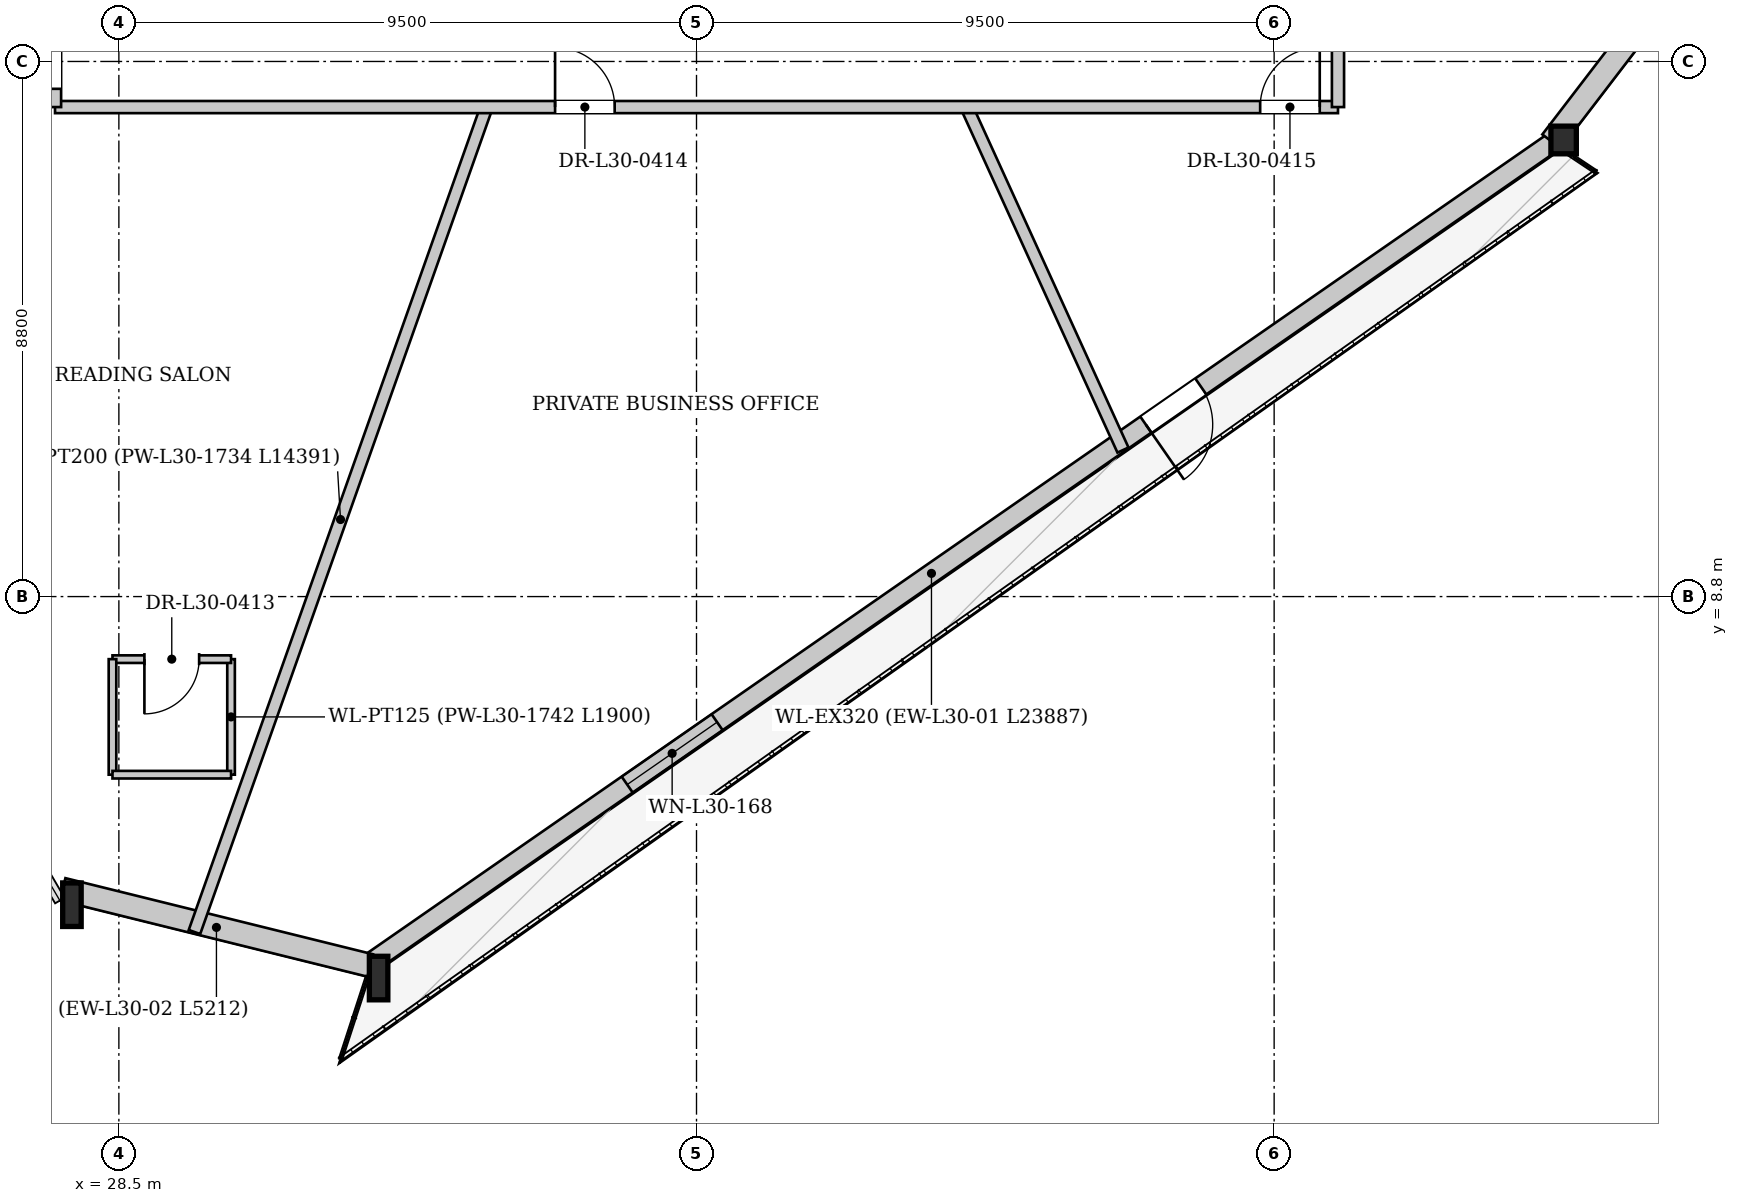
"""IFC4 building model, lengths in metres.
Left out: names, types, materials, properties, quantities, classifications, styles, units other than length and angle.
Written with IfcOpenShell. Run it as: python <this file> out.ifc"""

import sys

from ifc_helpers import new_model, si_unit, direction, frame, frame_2d, origin, origin_2d, place, context, subcontext, project, spatial, rectangle, i_section, extrude, source, transform, mapped, element, fill, save


model = new_model("IFC4")
c1 = context("Model", 3, precision=1e-05, world=origin(), true_north=direction((0.0, 1.0)))
c2 = subcontext(c1, "Body", "Model", "MODEL_VIEW")
j1 = project(units=[si_unit("LENGTHUNIT", "METRE"), si_unit("PLANEANGLEUNIT", "RADIAN")], contexts=[c1])
p1 = place(None, origin())
s1 = spatial("IfcSite", under=j1, at=p1, CompositionType="ELEMENT")
p2 = place(p1, origin())
s2 = spatial("IfcBuilding", under=s1, at=p2, CompositionType="ELEMENT")
p3 = place(p2, frame((0.0, 0.0, 116.35)))
s3 = spatial("IfcBuildingStorey", under=s2, at=p3, CompositionType="ELEMENT", Elevation=116.35)
m1 = source(origin(), c2, "Body", "SweptSolid", [
    extrude(i_section(OverallWidth=0.304, OverallDepth=0.716, WebThickness=0.021, FlangeThickness=0.04, at=origin_2d()), origin(), (0.0, 0.0, 1.0), 3.411),
])
p4 = place(p3, frame((27.53, 3.801, 0.0), z_axis=(0.116382892028, -0.039867940258, 0.992403934788), x_axis=(0.324071441703, 0.946032610787, 0.0)))
e1 = element("IfcColumn", 1, at=p4, inside=s3, PredefinedType="COLUMN", context=c2, shape_type="MappedRepresentation", body=[
    mapped(m1, transform((0.0, 0.0, 0.0), x_axis=(1.0, 0.0, 0.0), y_axis=(0.0, 1.0, 0.0), z_axis=(0.0, 0.0, 1.0), scale=1.0)),
])
m2 = source(origin(), c2, "Body", "SweptSolid", [
    extrude(i_section(OverallWidth=0.304, OverallDepth=0.716, WebThickness=0.021, FlangeThickness=0.04, at=origin_2d()), origin(), (0.0, 0.0, 1.0), 3.405),
])
p5 = place(p3, frame((32.588, 2.549, 0.0), z_axis=(0.107549004209, -0.013264377186, 0.994111295576), x_axis=(0.122405882176, 0.99248012575, 0.0)))
e2 = element("IfcColumn", 2, at=p5, inside=s3, PredefinedType="COLUMN", context=c2, shape_type="MappedRepresentation", body=[
    mapped(m2, transform((0.0, 0.0, 0.0), x_axis=(1.0, 0.0, 0.0), y_axis=(0.0, 1.0, 0.0), z_axis=(0.0, 0.0, 1.0), scale=1.0)),
])
m3 = source(origin(), c2, "Body", "SweptSolid", [
    extrude(i_section(OverallWidth=0.418, OverallDepth=0.455, WebThickness=0.038, FlangeThickness=0.059, at=origin_2d()), origin(), (0.0, 0.0, 1.0), 3.398),
])
p6 = place(p3, frame((52.212, 16.169, 0.0), z_axis=(0.02845253768, 0.08233991965, 0.996198068022), x_axis=(-0.945162434362, 0.326600631769, 0.0)))
e3 = element("IfcColumn", 3, at=p6, inside=s3, PredefinedType="COLUMN", context=c2, shape_type="MappedRepresentation", body=[
    mapped(m3, transform((0.0, 0.0, 0.0), x_axis=(1.0, 0.0, 0.0), y_axis=(0.0, 1.0, 0.0), z_axis=(0.0, 0.0, 1.0), scale=1.0)),
])
p7 = place(p3, frame((52.121, 16.301, 0.0), z_axis=(0.0, 0.0, 1.0), x_axis=(-0.821520503946, -0.570178973303, 0.0)))
e4 = element("IfcWall", 4, at=p7, inside=s3, PredefinedType="SOLIDWALL", context=c2, shape_type="SweptSolid", body=[
    extrude(rectangle(XDim=23.887, YDim=0.32, at=frame_2d((11.944, 0.0))), origin(), (0.0, 0.0, 1.0), 2.692),
])
p8 = place(p7, frame((7.094, 0.0, 0.0)))
e5 = element("IfcOpeningElement", 5, at=p8, cuts=e4, PredefinedType="OPENING", context=c2, shape_type="SweptSolid", body=[
    extrude(rectangle(XDim=1.1, YDim=2.3, at=frame_2d((0.55, 1.15))), frame((0.0, 0.17, 0.0), z_axis=(0.0, -1.0, 0.0), x_axis=(1.0, 0.0, 0.0)), (0.0, 0.0, 1.0), 0.34),
])
p9 = place(p7, frame((16.777, 0.0, 0.372)))
e6 = element("IfcOpeningElement", 6, at=p9, cuts=e4, PredefinedType="OPENING", context=c2, shape_type="SweptSolid", body=[
    extrude(rectangle(XDim=1.8, YDim=2.2, at=frame_2d((0.9, 1.1))), frame((0.0, 0.17, 0.0), z_axis=(0.0, -1.0, 0.0), x_axis=(1.0, 0.0, 0.0)), (0.0, 0.0, 1.0), 0.34),
])
p10 = place(p3, frame((32.634, 2.733, 0.0), z_axis=(0.0, 0.0, 1.0), x_axis=(-0.970715706746, 0.240231173408, 0.0)))
e7 = element("IfcWall", 7, at=p10, inside=s3, PredefinedType="SOLIDWALL", context=c2, shape_type="SweptSolid", body=[
    extrude(rectangle(XDim=5.211, YDim=0.38, at=frame_2d((2.606, 0.0))), origin(), (0.0, 0.0, 1.0), 2.692),
])
p11 = place(p3, frame((66.591, 35.245, 0.0), z_axis=(0.0, 0.0, 1.0), x_axis=(-0.608252150968, -0.7937438635, 0.0)))
e8 = element("IfcWall", 8, at=p11, inside=s3, PredefinedType="SOLIDWALL", context=c2, shape_type="SweptSolid", body=[
    extrude(rectangle(XDim=23.887, YDim=0.38, at=frame_2d((11.944, 0.0))), origin(), (0.0, 0.0, 1.0), 2.692),
])
p12 = place(p11, frame((6.088, 0.0, 0.65)))
e9 = element("IfcOpeningElement", 9, at=p12, cuts=e8, PredefinedType="OPENING", context=c2, shape_type="SweptSolid", body=[
    extrude(rectangle(XDim=1.2, YDim=1.5, at=frame_2d((0.6, 0.75))), frame((0.0, 0.2, 0.0), z_axis=(0.0, -1.0, 0.0), x_axis=(1.0, 0.0, 0.0)), (0.0, 0.0, 1.0), 0.4),
])
p13 = place(p11, frame((16.599, 0.0, 0.65)))
e10 = element("IfcOpeningElement", 10, at=p13, cuts=e8, PredefinedType="OPENING", context=c2, shape_type="SweptSolid", body=[
    extrude(rectangle(XDim=1.2, YDim=1.5, at=frame_2d((0.6, 0.75))), frame((0.0, 0.2, 0.0), z_axis=(0.0, -1.0, 0.0), x_axis=(1.0, 0.0, 0.0)), (0.0, 0.0, 1.0), 0.4),
])
p14 = place(p3, frame((34.547, 16.85, 0.0), z_axis=(0.0, 0.0, 1.0), x_axis=(-0.333802235789, -0.942643128327, 0.0)))
e11 = element("IfcWall", 11, at=p14, inside=s3, PredefinedType="PARTITIONING", context=c2, shape_type="SweptSolid", body=[
    extrude(rectangle(XDim=14.392, YDim=0.2, at=frame_2d((7.196, 0.0))), origin(), (0.0, 0.0, 1.0), 3.3),
])
p15 = place(p3, frame((42.443, 16.85, 0.0), z_axis=(0.0, 0.0, 1.0), x_axis=(0.41469000073, -0.909962748301, 0.0)))
e12 = element("IfcWall", 12, at=p15, inside=s3, PredefinedType="PARTITIONING", context=c2, shape_type="SweptSolid", body=[
    extrude(rectangle(XDim=6.199, YDim=0.2, at=frame_2d((3.099, 0.0))), origin(), (0.0, 0.0, 1.0), 3.3),
])
p16 = place(p3, frame((27.45, 19.349, 0.0), z_axis=(0.0, 0.0, 1.0), x_axis=(-0.824117180706, -0.566419343301, 0.0)))
e13 = element("IfcWall", 13, at=p16, inside=s3, PredefinedType="PARTITIONING", context=c2, shape_type="SweptSolid", body=[
    extrude(rectangle(XDim=7.761, YDim=0.2, at=frame_2d((3.88, 0.0))), origin(), (0.0, 0.0, 1.0), 3.3),
])
p17 = place(p3, frame((30.345, 5.871, 0.0), z_axis=(0.0, 0.0, 1.0), x_axis=(0.0, 1.0, 0.0)))
e14 = element("IfcWall", 14, at=p17, inside=s3, PredefinedType="PARTITIONING", context=c2, shape_type="SweptSolid", body=[
    extrude(rectangle(XDim=1.9, YDim=0.125, at=frame_2d((0.95, 0.0))), origin(), (0.0, 0.0, 1.0), 3.3),
])
p18 = place(p3, frame((30.345, 7.771, 0.0), z_axis=(0.0, 0.0, 1.0), x_axis=(-1.0, 0.0, 0.0)))
e15 = element("IfcWall", 15, at=p18, inside=s3, PredefinedType="PARTITIONING", context=c2, shape_type="SweptSolid", body=[
    extrude(rectangle(XDim=1.95, YDim=0.125, at=frame_2d((0.975, 0.0))), origin(), (0.0, 0.0, 1.0), 3.3),
])
p19 = place(p18, frame((0.525, 0.0, 0.0)))
e16 = element("IfcOpeningElement", 16, at=p19, cuts=e15, PredefinedType="OPENING", context=c2, shape_type="SweptSolid", body=[
    extrude(rectangle(XDim=0.9, YDim=2.1, at=frame_2d((0.45, 1.05))), frame((0.0, 0.073, 0.0), z_axis=(0.0, -1.0, 0.0), x_axis=(1.0, 0.0, 0.0)), (0.0, 0.0, 1.0), 0.145),
])
p20 = place(p3, frame((28.395, 7.771, 0.0), z_axis=(0.0, 0.0, 1.0), x_axis=(0.0, -1.0, 0.0)))
e17 = element("IfcWall", 17, at=p20, inside=s3, PredefinedType="PARTITIONING", context=c2, shape_type="SweptSolid", body=[
    extrude(rectangle(XDim=1.9, YDim=0.125, at=frame_2d((0.95, 0.0))), origin(), (0.0, 0.0, 1.0), 3.3),
])
p21 = place(p3, frame((28.395, 5.871, 0.0), z_axis=(0.0, 0.0, 1.0), x_axis=(1.0, 0.0, 0.0)))
e18 = element("IfcWall", 18, at=p21, inside=s3, PredefinedType="PARTITIONING", context=c2, shape_type="SweptSolid", body=[
    extrude(rectangle(XDim=1.95, YDim=0.125, at=frame_2d((0.975, 0.0))), origin(), (0.0, 0.0, 1.0), 3.3),
])
p22 = place(p3, frame((27.45, 16.85, 0.0), z_axis=(0.0, 0.0, 1.0), x_axis=(1.0, 0.0, 0.0)))
e19 = element("IfcWall", 19, at=p22, inside=s3, PredefinedType="PARTITIONING", context=c2, shape_type="SweptSolid", body=[
    extrude(rectangle(XDim=21.1, YDim=0.2, at=frame_2d((10.55, 0.0))), origin(), (0.0, 0.0, 1.0), 3.045),
])
p23 = place(p22, frame((8.224, 0.0, 0.0)))
e20 = element("IfcOpeningElement", 20, at=p23, cuts=e19, PredefinedType="OPENING", context=c2, shape_type="SweptSolid", body=[
    extrude(rectangle(XDim=0.98, YDim=2.15, at=frame_2d((0.49, 1.075))), frame((0.0, 0.11, 0.0), z_axis=(0.0, -1.0, 0.0), x_axis=(1.0, 0.0, 0.0)), (0.0, 0.0, 1.0), 0.22),
])
p24 = place(p22, frame((19.82, 0.0, 0.0)))
e21 = element("IfcOpeningElement", 21, at=p24, cuts=e19, PredefinedType="OPENING", context=c2, shape_type="SweptSolid", body=[
    extrude(rectangle(XDim=0.98, YDim=2.15, at=frame_2d((0.49, 1.075))), frame((0.0, 0.11, 0.0), z_axis=(0.0, -1.0, 0.0), x_axis=(1.0, 0.0, 0.0)), (0.0, 0.0, 1.0), 0.22),
])
p25 = place(p3, frame((27.45, 16.85, 0.0), z_axis=(0.0, 0.0, 1.0), x_axis=(0.0, 1.0, 0.0)))
e22 = element("IfcWall", 22, at=p25, inside=s3, PredefinedType="PARTITIONING", context=c2, shape_type="SweptSolid", body=[
    extrude(rectangle(XDim=19.5, YDim=0.2, at=frame_2d((9.75, 0.0))), origin(), (0.0, 0.0, 1.0), 3.3),
])
p26 = place(p25, frame((17.434, 0.0, 0.0)))
e23 = element("IfcOpeningElement", 23, at=p26, cuts=e22, PredefinedType="OPENING", context=c2, shape_type="SweptSolid", body=[
    extrude(rectangle(XDim=0.98, YDim=2.15, at=frame_2d((0.49, 1.075))), frame((0.0, 0.11, 0.0), z_axis=(0.0, -1.0, 0.0), x_axis=(1.0, 0.0, 0.0)), (0.0, 0.0, 1.0), 0.22),
])
p27 = place(p25, frame((7.437, 0.0, 0.0)))
e24 = element("IfcOpeningElement", 24, at=p27, cuts=e22, PredefinedType="OPENING", context=c2, shape_type="SweptSolid", body=[
    extrude(rectangle(XDim=0.98, YDim=2.15, at=frame_2d((0.49, 1.075))), frame((0.0, 0.11, 0.0), z_axis=(0.0, -1.0, 0.0), x_axis=(1.0, 0.0, 0.0)), (0.0, 0.0, 1.0), 0.22),
])
p28 = place(p25, frame((0.3, 0.0, 0.0)))
e25 = element("IfcOpeningElement", 25, at=p28, cuts=e22, PredefinedType="OPENING", context=c2, shape_type="SweptSolid", body=[
    extrude(rectangle(XDim=0.98, YDim=2.15, at=frame_2d((0.49, 1.075))), frame((0.0, 0.11, 0.0), z_axis=(0.0, -1.0, 0.0), x_axis=(1.0, 0.0, 0.0)), (0.0, 0.0, 1.0), 0.22),
])
p29 = place(p3, frame((48.55, 16.85, 0.0), z_axis=(0.0, 0.0, 1.0), x_axis=(0.0, 1.0, 0.0)))
e26 = element("IfcWall", 26, at=p29, inside=s3, PredefinedType="PARTITIONING", context=c2, shape_type="SweptSolid", body=[
    extrude(rectangle(XDim=19.5, YDim=0.2, at=frame_2d((9.75, 0.0))), origin(), (0.0, 0.0, 1.0), 3.3),
])
p30 = place(p29, frame((9.368, 0.0, 0.0)))
e27 = element("IfcOpeningElement", 27, at=p30, cuts=e26, PredefinedType="OPENING", context=c2, shape_type="SweptSolid", body=[
    extrude(rectangle(XDim=0.98, YDim=2.15, at=frame_2d((0.49, 1.075))), frame((0.0, 0.11, 0.0), z_axis=(0.0, -1.0, 0.0), x_axis=(1.0, 0.0, 0.0)), (0.0, 0.0, 1.0), 0.22),
])
m4 = source(origin(), c2, "Body", "SweptSolid", [
    extrude(rectangle(XDim=1.1, YDim=2.3, at=frame_2d((0.55, 1.15))), frame((0.0, 0.025, 0.0), z_axis=(0.0, -1.0, 0.0), x_axis=(1.0, 0.0, 0.0)), (0.0, 0.0, 1.0), 0.05),
])
p31 = place(p8, origin())
e28 = element("IfcDoor", 28, at=p31, inside=s3, OperationType="SINGLE_SWING_RIGHT", PredefinedType="DOOR", context=c2, shape_type="MappedRepresentation", body=[
    mapped(m4, transform((0.0, 0.0, 0.0), x_axis=(1.0, 0.0, 0.0), y_axis=(0.0, 1.0, 0.0), z_axis=(0.0, 0.0, 1.0), scale=1.0)),
])
fill(e5, e28)
m5 = source(origin(), c2, "Body", "SweptSolid", [
    extrude(rectangle(XDim=1.8, YDim=2.2, at=frame_2d((0.9, 1.1))), frame((0.0, 0.03, 0.0), z_axis=(0.0, -1.0, 0.0), x_axis=(1.0, 0.0, 0.0)), (0.0, 0.0, 1.0), 0.06),
])
p32 = place(p9, origin())
e29 = element("IfcWindow", 29, at=p32, inside=s3, PartitioningType="SINGLE_PANEL", PredefinedType="WINDOW", context=c2, shape_type="MappedRepresentation", body=[
    mapped(m5, transform((0.0, 0.0, 0.0), x_axis=(1.0, 0.0, 0.0), y_axis=(0.0, 1.0, 0.0), z_axis=(0.0, 0.0, 1.0), scale=1.0)),
])
fill(e6, e29)
m6 = source(origin(), c2, "Body", "SweptSolid", [
    extrude(rectangle(XDim=0.9, YDim=2.1, at=frame_2d((0.45, 1.05))), frame((0.0, 0.025, 0.0), z_axis=(0.0, -1.0, 0.0), x_axis=(1.0, 0.0, 0.0)), (0.0, 0.0, 1.0), 0.05),
])
p33 = place(p19, origin())
e30 = element("IfcDoor", 30, at=p33, inside=s3, OperationType="SINGLE_SWING_RIGHT", PredefinedType="DOOR", context=c2, shape_type="MappedRepresentation", body=[
    mapped(m6, transform((0.0, 0.0, 0.0), x_axis=(1.0, 0.0, 0.0), y_axis=(0.0, 1.0, 0.0), z_axis=(0.0, 0.0, 1.0), scale=1.0)),
])
fill(e16, e30)
m7 = source(origin(), c2, "Body", "SweptSolid", [
    extrude(rectangle(XDim=0.98, YDim=2.15, at=frame_2d((0.49, 1.075))), frame((0.0, 0.025, 0.0), z_axis=(0.0, -1.0, 0.0), x_axis=(1.0, 0.0, 0.0)), (0.0, 0.0, 1.0), 0.05),
])
p34 = place(p23, origin())
e31 = element("IfcDoor", 31, at=p34, inside=s3, OperationType="SINGLE_SWING_LEFT", PredefinedType="DOOR", context=c2, shape_type="MappedRepresentation", body=[
    mapped(m7, transform((0.0, 0.0, 0.0), x_axis=(1.0, 0.0, 0.0), y_axis=(0.0, 1.0, 0.0), z_axis=(0.0, 0.0, 1.0), scale=1.0)),
])
fill(e20, e31)
p35 = place(p24, origin())
e32 = element("IfcDoor", 32, at=p35, inside=s3, OperationType="SINGLE_SWING_RIGHT", PredefinedType="DOOR", context=c2, shape_type="MappedRepresentation", body=[
    mapped(m7, transform((0.0, 0.0, 0.0), x_axis=(1.0, 0.0, 0.0), y_axis=(0.0, 1.0, 0.0), z_axis=(0.0, 0.0, 1.0), scale=1.0)),
])
fill(e21, e32)
p36 = place(p28, origin())
e33 = element("IfcDoor", 33, at=p36, inside=s3, OperationType="SINGLE_SWING_RIGHT", PredefinedType="DOOR", context=c2, shape_type="MappedRepresentation", body=[
    mapped(m7, transform((0.0, 0.0, 0.0), x_axis=(1.0, 0.0, 0.0), y_axis=(0.0, 1.0, 0.0), z_axis=(0.0, 0.0, 1.0), scale=1.0)),
])
fill(e25, e33)
save(model, sys.argv[1])
